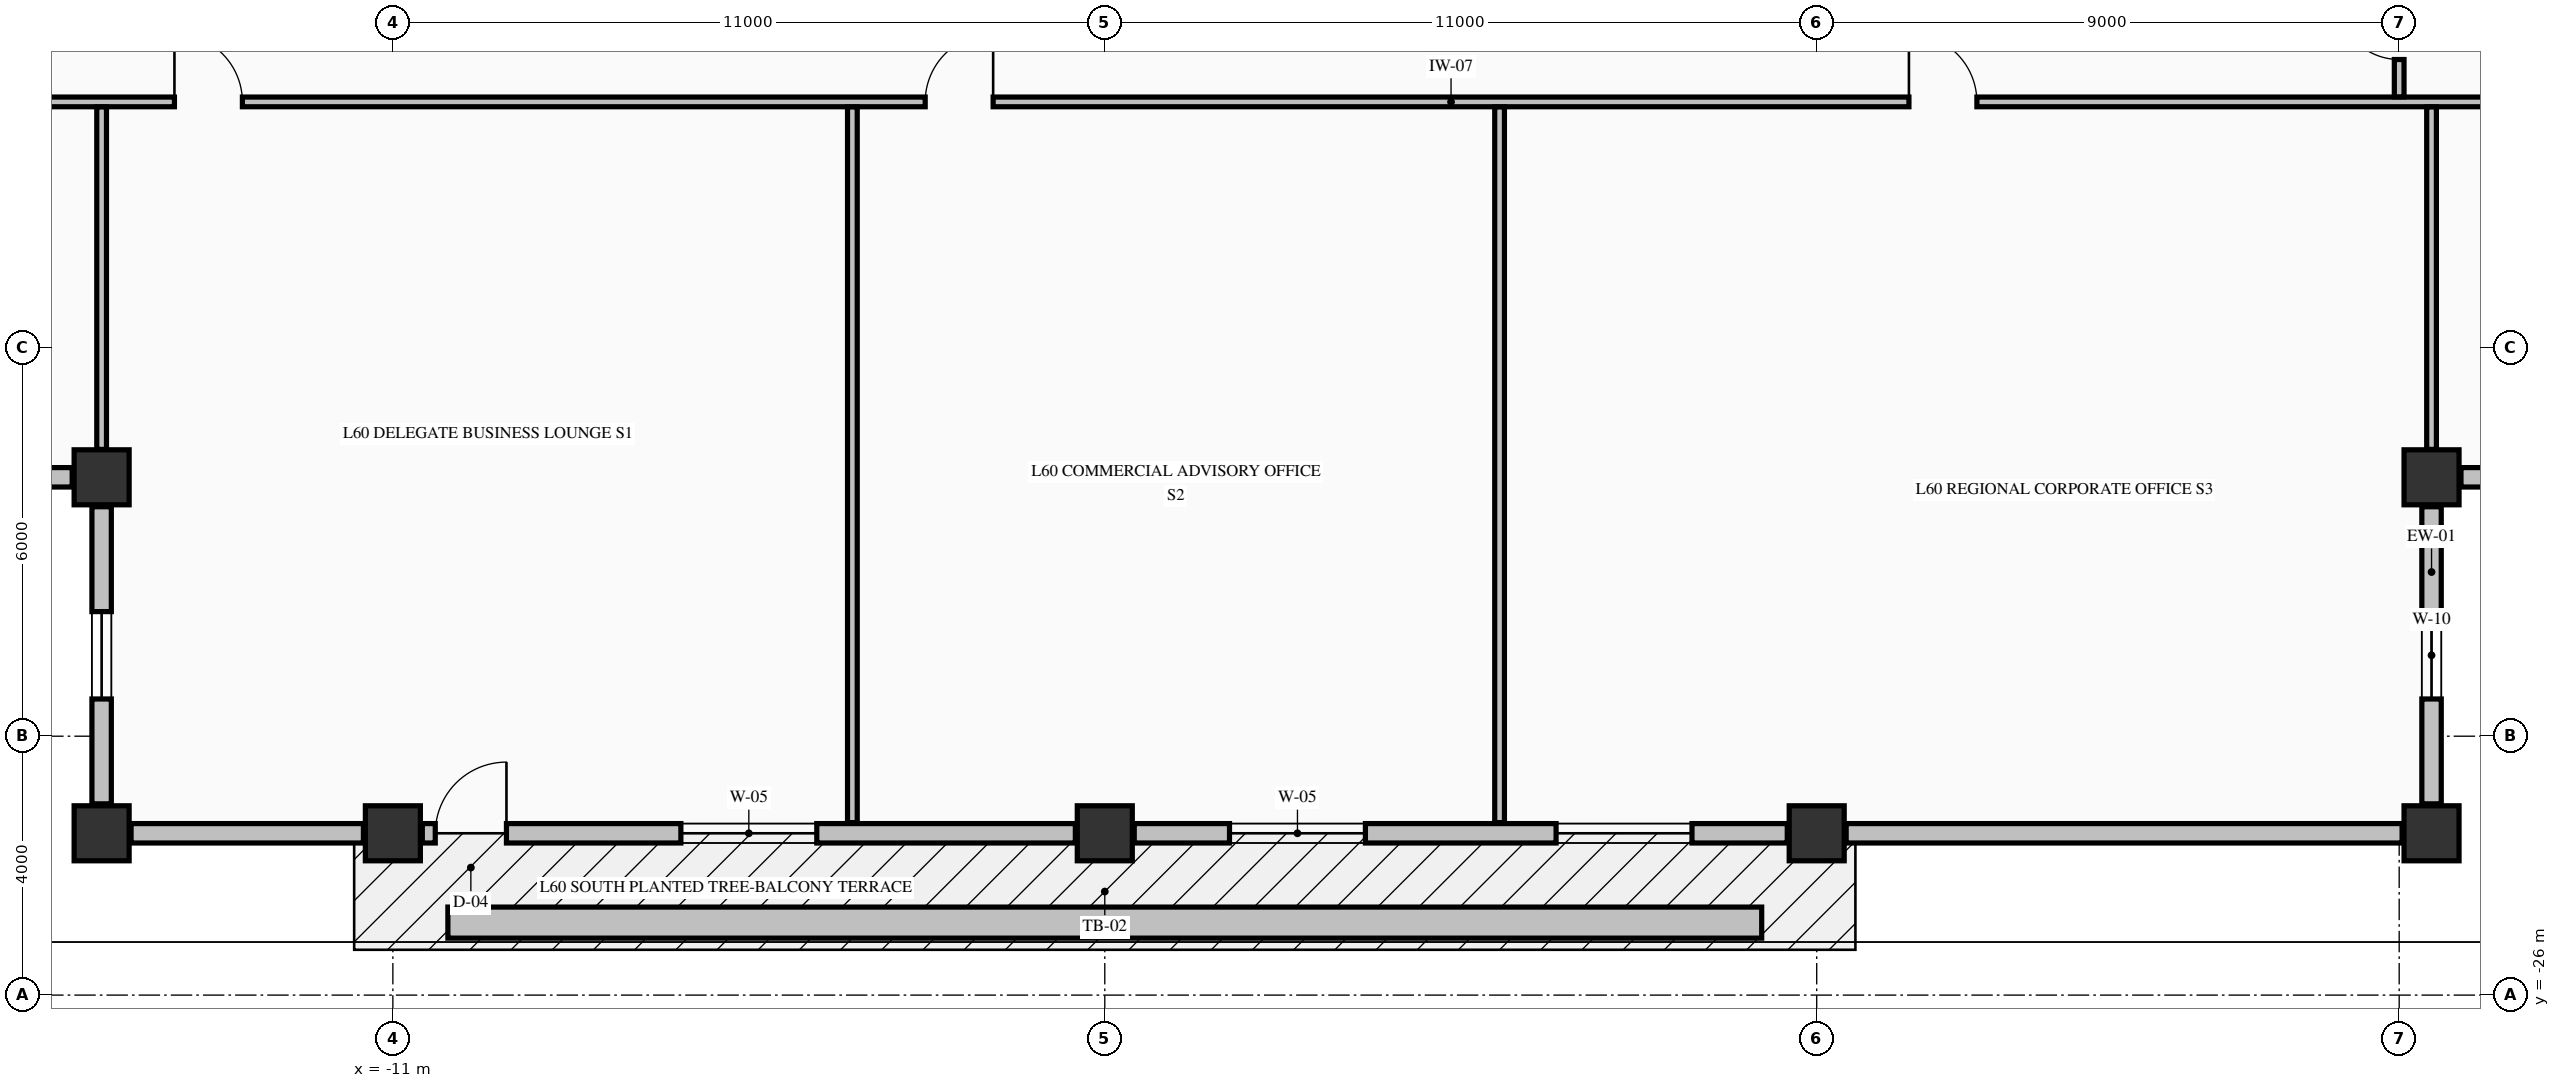
"""IFC4 building model, lengths in metres.
Left out: names, types, materials, properties, quantities, classifications, styles, units other than length and angle.
Written with IfcOpenShell. Run it as: python <this file> out.ifc"""

import sys

from ifc_helpers import new_model, si_unit, direction, frame, frame_2d, origin, origin_2d, place, context, subcontext, project, spatial, rectangle, extrude, element, fill, save


model = new_model("IFC4")
c1 = context("Model", 3, precision=1e-05, world=origin(), true_north=direction((0.0, 1.0)))
c2 = subcontext(c1, "Body", "Model", "MODEL_VIEW")
j1 = project(units=[si_unit("LENGTHUNIT", "METRE"), si_unit("PLANEANGLEUNIT", "RADIAN")], contexts=[c1])
p1 = place(None, origin())
s1 = spatial("IfcSite", under=j1, at=p1, CompositionType="ELEMENT")
p2 = place(p1, origin())
s2 = spatial("IfcBuilding", under=s1, at=p2, CompositionType="ELEMENT")
p3 = place(p2, frame((0.0, 0.0, 230.05)))
s3 = spatial("IfcBuildingStorey", under=s2, at=p3, CompositionType="ELEMENT", Elevation=230.05)
for number, where, z_axis, x_axis in (
    (1, (-15.5, -23.5, -0.25), (0.0, 0.0, 1.0), (1.0, 0.0, 0.0)),
    (2, (-11.0, -23.5, -0.25), (0.0, 0.0, 1.0), (1.0, 0.0, 0.0)),
    (3, (0.0, -23.5, -0.25), (0.0, 0.0, 1.0), (1.0, 0.0, 0.0)),
    (4, (11.0, -23.5, -0.25), (0.0, 0.0, 1.0), (1.0, 0.0, 0.0)),
    (5, (20.5, -23.5, -0.25), (0.0, 0.0, 1.0), (1.0, 0.0, 0.0)),
    (6, (-15.5, -18.0, -0.25), (0.0, 0.0, 1.0), (1.0, 0.0, 0.0)),
    (7, (20.5, -18.0, -0.25), (0.0, 0.0, 1.0), (1.0, 0.0, 0.0)),
):
    element("IfcColumn", number, at=place(p3, frame(where, z_axis=z_axis, x_axis=x_axis)), inside=s3, PredefinedType="COLUMN", context=c2, shape_type="SweptSolid", body=[
        extrude(rectangle(XDim=0.85, YDim=0.85, at=origin_2d()), origin(), (0.0, 0.0, 1.0), 3.23),
    ])
p4 = place(p3, frame((20.5, -23.045, 0.0), z_axis=(0.0, 0.0, 1.0), x_axis=(0.0, 1.0, 0.0)))
e8 = element("IfcWall", 8, at=p4, inside=s3, PredefinedType="STANDARD", context=c2, shape_type="SweptSolid", body=[
    extrude(rectangle(XDim=4.59, YDim=0.3, at=frame_2d((2.295, 0.0))), origin(), (0.0, 0.0, 1.0), 2.372),
])
p5 = place(p4, frame((1.62, 0.0, 0.68)))
e9 = element("IfcOpeningElement", 9, at=p5, cuts=e8, PredefinedType="OPENING", context=c2, shape_type="SweptSolid", body=[
    extrude(rectangle(XDim=1.35, YDim=1.42, at=frame_2d((0.675, 0.71))), frame((0.0, 0.16, 0.0), z_axis=(0.0, -1.0, 0.0), x_axis=(1.0, 0.0, 0.0)), (0.0, 0.0, 1.0), 0.32),
])
p6 = place(p3, frame((20.955, -18.0, 0.0), z_axis=(0.0, 0.0, 1.0), x_axis=(1.0, 0.0, 0.0)))
e10 = element("IfcWall", 10, at=p6, inside=s3, PredefinedType="STANDARD", context=c2, shape_type="SweptSolid", body=[
    extrude(rectangle(XDim=4.59, YDim=0.3, at=frame_2d((2.295, 0.0))), origin(), (0.0, 0.0, 1.0), 2.372),
])
p7 = place(p6, frame((1.62, 0.0, 0.68)))
e11 = element("IfcOpeningElement", 11, at=p7, cuts=e10, PredefinedType="OPENING", context=c2, shape_type="SweptSolid", body=[
    extrude(rectangle(XDim=1.35, YDim=1.42, at=frame_2d((0.675, 0.71))), frame((0.0, 0.16, 0.0), z_axis=(0.0, -1.0, 0.0), x_axis=(1.0, 0.0, 0.0)), (0.0, 0.0, 1.0), 0.32),
])
p8 = place(p3, frame((-20.545, -18.0, 0.0), z_axis=(0.0, 0.0, 1.0), x_axis=(1.0, 0.0, 0.0)))
e12 = element("IfcWall", 12, at=p8, inside=s3, PredefinedType="STANDARD", context=c2, shape_type="SweptSolid", body=[
    extrude(rectangle(XDim=4.59, YDim=0.3, at=frame_2d((2.295, 0.0))), origin(), (0.0, 0.0, 1.0), 2.372),
])
p9 = place(p8, frame((1.62, 0.0, 0.68)))
e13 = element("IfcOpeningElement", 13, at=p9, cuts=e12, PredefinedType="OPENING", context=c2, shape_type="SweptSolid", body=[
    extrude(rectangle(XDim=1.35, YDim=1.42, at=frame_2d((0.675, 0.71))), frame((0.0, 0.16, 0.0), z_axis=(0.0, -1.0, 0.0), x_axis=(1.0, 0.0, 0.0)), (0.0, 0.0, 1.0), 0.32),
])
p10 = place(p3, frame((-15.5, -18.455, 0.0), z_axis=(0.0, 0.0, 1.0), x_axis=(0.0, -1.0, 0.0)))
e14 = element("IfcWall", 14, at=p10, inside=s3, PredefinedType="STANDARD", context=c2, shape_type="SweptSolid", body=[
    extrude(rectangle(XDim=4.59, YDim=0.3, at=frame_2d((2.295, 0.0))), origin(), (0.0, 0.0, 1.0), 2.372),
])
p11 = place(p10, frame((1.62, 0.0, 0.68)))
e15 = element("IfcOpeningElement", 15, at=p11, cuts=e14, PredefinedType="OPENING", context=c2, shape_type="SweptSolid", body=[
    extrude(rectangle(XDim=1.35, YDim=1.42, at=frame_2d((0.675, 0.71))), frame((0.0, 0.16, 0.0), z_axis=(0.0, -1.0, 0.0), x_axis=(1.0, 0.0, 0.0)), (0.0, 0.0, 1.0), 0.32),
])
p12 = place(p3, frame((-15.045, -23.5, 0.0), z_axis=(0.0, 0.0, 1.0), x_axis=(1.0, 0.0, 0.0)))
e16 = element("IfcWall", 16, at=p12, inside=s3, PredefinedType="STANDARD", context=c2, shape_type="SweptSolid", body=[
    extrude(rectangle(XDim=3.59, YDim=0.3, at=frame_2d((1.795, 0.0))), origin(), (0.0, 0.0, 1.0), 2.372),
])
p13 = place(p3, frame((-10.545, -23.5, 0.0), z_axis=(0.0, 0.0, 1.0), x_axis=(1.0, 0.0, 0.0)))
e17 = element("IfcWall", 17, at=p13, inside=s3, PredefinedType="STANDARD", context=c2, shape_type="SweptSolid", body=[
    extrude(rectangle(XDim=10.09, YDim=0.3, at=frame_2d((5.045, 0.0))), origin(), (0.0, 0.0, 1.0), 2.372),
])
p14 = place(p13, frame((0.2, 0.0, 0.0)))
e18 = element("IfcOpeningElement", 18, at=p14, cuts=e17, PredefinedType="OPENING", context=c2, shape_type="SweptSolid", body=[
    extrude(rectangle(XDim=1.1, YDim=2.15, at=frame_2d((0.55, 1.075))), frame((0.0, 0.16, 0.0), z_axis=(0.0, -1.0, 0.0), x_axis=(1.0, 0.0, 0.0)), (0.0, 0.0, 1.0), 0.32),
])
p15 = place(p13, frame((3.995, 0.0, 0.7)))
e19 = element("IfcOpeningElement", 19, at=p15, cuts=e17, PredefinedType="OPENING", context=c2, shape_type="SweptSolid", body=[
    extrude(rectangle(XDim=2.1, YDim=1.5, at=frame_2d((1.05, 0.75))), frame((0.0, 0.16, 0.0), z_axis=(0.0, -1.0, 0.0), x_axis=(1.0, 0.0, 0.0)), (0.0, 0.0, 1.0), 0.32),
])
p16 = place(p3, frame((0.455, -23.5, 0.0), z_axis=(0.0, 0.0, 1.0), x_axis=(1.0, 0.0, 0.0)))
e20 = element("IfcWall", 20, at=p16, inside=s3, PredefinedType="STANDARD", context=c2, shape_type="SweptSolid", body=[
    extrude(rectangle(XDim=10.09, YDim=0.3, at=frame_2d((5.045, 0.0))), origin(), (0.0, 0.0, 1.0), 2.372),
])
p17 = place(p16, frame((1.472, 0.0, 0.7)))
e21 = element("IfcOpeningElement", 21, at=p17, cuts=e20, PredefinedType="OPENING", context=c2, shape_type="SweptSolid", body=[
    extrude(rectangle(XDim=2.1, YDim=1.5, at=frame_2d((1.05, 0.75))), frame((0.0, 0.16, 0.0), z_axis=(0.0, -1.0, 0.0), x_axis=(1.0, 0.0, 0.0)), (0.0, 0.0, 1.0), 0.32),
])
p18 = place(p16, frame((6.518, 0.0, 0.7)))
e22 = element("IfcOpeningElement", 22, at=p18, cuts=e20, PredefinedType="OPENING", context=c2, shape_type="SweptSolid", body=[
    extrude(rectangle(XDim=2.1, YDim=1.5, at=frame_2d((1.05, 0.75))), frame((0.0, 0.16, 0.0), z_axis=(0.0, -1.0, 0.0), x_axis=(1.0, 0.0, 0.0)), (0.0, 0.0, 1.0), 0.32),
])
p19 = place(p3, frame((11.455, -23.5, 0.0), z_axis=(0.0, 0.0, 1.0), x_axis=(1.0, 0.0, 0.0)))
e23 = element("IfcWall", 23, at=p19, inside=s3, PredefinedType="STANDARD", context=c2, shape_type="SweptSolid", body=[
    extrude(rectangle(XDim=8.59, YDim=0.3, at=frame_2d((4.295, 0.0))), origin(), (0.0, 0.0, 1.0), 2.372),
])
p20 = place(p3, frame((-20.075, -12.2, 0.0), z_axis=(0.0, 0.0, 1.0), x_axis=(1.0, 0.0, 0.0)))
e24 = element("IfcWall", 24, at=p20, inside=s3, PredefinedType="PARTITIONING", context=c2, shape_type="SweptSolid", body=[
    extrude(rectangle(XDim=45.91, YDim=0.15, at=frame_2d((22.955, 0.0))), origin(), (0.0, 0.0, 1.0), 2.98),
])
p21 = place(p20, frame((5.7, 0.0, 0.0)))
e25 = element("IfcOpeningElement", 25, at=p21, cuts=e24, PredefinedType="OPENING", context=c2, shape_type="SweptSolid", body=[
    extrude(rectangle(XDim=1.05, YDim=2.15, at=frame_2d((0.525, 1.075))), frame((0.0, 0.085, 0.0), z_axis=(0.0, -1.0, 0.0), x_axis=(1.0, 0.0, 0.0)), (0.0, 0.0, 1.0), 0.17),
])
p22 = place(p20, frame((17.3, 0.0, 0.0)))
e26 = element("IfcOpeningElement", 26, at=p22, cuts=e24, PredefinedType="OPENING", context=c2, shape_type="SweptSolid", body=[
    extrude(rectangle(XDim=1.05, YDim=2.15, at=frame_2d((0.525, 1.075))), frame((0.0, 0.085, 0.0), z_axis=(0.0, -1.0, 0.0), x_axis=(1.0, 0.0, 0.0)), (0.0, 0.0, 1.0), 0.17),
])
p23 = place(p20, frame((32.5, 0.0, 0.0)))
e27 = element("IfcOpeningElement", 27, at=p23, cuts=e24, PredefinedType="OPENING", context=c2, shape_type="SweptSolid", body=[
    extrude(rectangle(XDim=1.05, YDim=2.15, at=frame_2d((0.525, 1.075))), frame((0.0, 0.085, 0.0), z_axis=(0.0, -1.0, 0.0), x_axis=(1.0, 0.0, 0.0)), (0.0, 0.0, 1.0), 0.17),
])
p24 = place(p3, frame((-15.5, -17.569, 0.0), z_axis=(0.0, 0.0, 1.0), x_axis=(0.0, 1.0, 0.0)))
e28 = element("IfcWall", 28, at=p24, inside=s3, PredefinedType="PARTITIONING", context=c2, shape_type="SweptSolid", body=[
    extrude(rectangle(XDim=5.291, YDim=0.15, at=frame_2d((2.646, 0.0))), origin(), (0.0, 0.0, 1.0), 2.98),
])
for number, where, z_axis, x_axis in (
    (29, (-3.9, -23.335, 0.0), (0.0, 0.0, 1.0), (0.0, 1.0, 0.0)),
    (30, (6.1, -23.335, 0.0), (0.0, 0.0, 1.0), (0.0, 1.0, 0.0)),
):
    element("IfcWall", number, at=place(p3, frame(where, z_axis=z_axis, x_axis=x_axis)), inside=s3, PredefinedType="PARTITIONING", context=c2, shape_type="SweptSolid", body=[
        extrude(rectangle(XDim=11.057, YDim=0.15, at=frame_2d((5.528, 0.0))), origin(), (0.0, 0.0, 1.0), 2.98),
    ])
p25 = place(p3, frame((20.0, -12.122, 0.0), z_axis=(0.0, 0.0, 1.0), x_axis=(0.0, 1.0, 0.0)))
e31 = element("IfcWall", 31, at=p25, inside=s3, PredefinedType="PARTITIONING", context=c2, shape_type="SweptSolid", body=[
    extrude(rectangle(XDim=1.816, YDim=0.15, at=frame_2d((0.908, 0.0))), origin(), (0.0, 0.0, 1.0), 2.98),
])
p26 = place(p25, frame((0.577, 0.0, 0.0)))
e32 = element("IfcOpeningElement", 32, at=p26, cuts=e31, PredefinedType="OPENING", context=c2, shape_type="SweptSolid", body=[
    extrude(rectangle(XDim=0.95, YDim=2.15, at=frame_2d((0.475, 1.075))), frame((0.0, 0.085, 0.0), z_axis=(0.0, -1.0, 0.0), x_axis=(1.0, 0.0, 0.0)), (0.0, 0.0, 1.0), 0.17),
])
p27 = place(p3, frame((20.5, -17.569, 0.0), z_axis=(0.0, 0.0, 1.0), x_axis=(0.0, 1.0, 0.0)))
e33 = element("IfcWall", 33, at=p27, inside=s3, PredefinedType="PARTITIONING", context=c2, shape_type="SweptSolid", body=[
    extrude(rectangle(XDim=5.291, YDim=0.15, at=frame_2d((2.646, 0.0))), origin(), (0.0, 0.0, 1.0), 2.98),
])
p28 = place(p3, frame((-10.15, -24.88, -0.04), z_axis=(0.0, 0.0, 1.0), x_axis=(1.0, 0.0, 0.0)))
e34 = element("IfcWall", 34, at=p28, inside=s3, PredefinedType="PARAPET", context=c2, shape_type="SweptSolid", body=[
    extrude(rectangle(XDim=20.3, YDim=0.48, at=frame_2d((10.15, 0.0))), origin(), (0.0, 0.0, 1.0), 0.52),
])
p29 = place(p5, origin())
e35 = element("IfcWindow", 35, at=p29, inside=s3, PartitioningType="SINGLE_PANEL", PredefinedType="WINDOW", context=c2, shape_type="SweptSolid", body=[
    extrude(rectangle(XDim=1.35, YDim=1.42, at=frame_2d((0.675, 0.71))), frame((0.0, 0.03, 0.0), z_axis=(0.0, -1.0, 0.0), x_axis=(1.0, 0.0, 0.0)), (0.0, 0.0, 1.0), 0.06),
])
fill(e9, e35)
p30 = place(p11, origin())
e36 = element("IfcWindow", 36, at=p30, inside=s3, PartitioningType="SINGLE_PANEL", PredefinedType="WINDOW", context=c2, shape_type="SweptSolid", body=[
    extrude(rectangle(XDim=1.35, YDim=1.42, at=frame_2d((0.675, 0.71))), frame((0.0, 0.03, 0.0), z_axis=(0.0, -1.0, 0.0), x_axis=(1.0, 0.0, 0.0)), (0.0, 0.0, 1.0), 0.06),
])
fill(e15, e36)
p31 = place(p14, origin())
e37 = element("IfcDoor", 37, at=p31, inside=s3, OperationType="SINGLE_SWING_RIGHT", PredefinedType="DOOR", context=c2, shape_type="SweptSolid", body=[
    extrude(rectangle(XDim=1.1, YDim=2.15, at=frame_2d((0.55, 1.075))), frame((0.0, 0.025, 0.0), z_axis=(0.0, -1.0, 0.0), x_axis=(1.0, 0.0, 0.0)), (0.0, 0.0, 1.0), 0.05),
])
fill(e18, e37)
p32 = place(p15, origin())
e38 = element("IfcWindow", 38, at=p32, inside=s3, PartitioningType="SINGLE_PANEL", PredefinedType="WINDOW", context=c2, shape_type="SweptSolid", body=[
    extrude(rectangle(XDim=2.1, YDim=1.5, at=frame_2d((1.05, 0.75))), frame((0.0, 0.03, 0.0), z_axis=(0.0, -1.0, 0.0), x_axis=(1.0, 0.0, 0.0)), (0.0, 0.0, 1.0), 0.06),
])
fill(e19, e38)
p33 = place(p17, origin())
e39 = element("IfcWindow", 39, at=p33, inside=s3, PartitioningType="SINGLE_PANEL", PredefinedType="WINDOW", context=c2, shape_type="SweptSolid", body=[
    extrude(rectangle(XDim=2.1, YDim=1.5, at=frame_2d((1.05, 0.75))), frame((0.0, 0.03, 0.0), z_axis=(0.0, -1.0, 0.0), x_axis=(1.0, 0.0, 0.0)), (0.0, 0.0, 1.0), 0.06),
])
fill(e21, e39)
p34 = place(p18, origin())
e40 = element("IfcWindow", 40, at=p34, inside=s3, PartitioningType="SINGLE_PANEL", PredefinedType="WINDOW", context=c2, shape_type="SweptSolid", body=[
    extrude(rectangle(XDim=2.1, YDim=1.5, at=frame_2d((1.05, 0.75))), frame((0.0, 0.03, 0.0), z_axis=(0.0, -1.0, 0.0), x_axis=(1.0, 0.0, 0.0)), (0.0, 0.0, 1.0), 0.06),
])
fill(e22, e40)
p35 = place(p21, origin())
e41 = element("IfcDoor", 41, at=p35, inside=s3, OperationType="SINGLE_SWING_LEFT", PredefinedType="DOOR", context=c2, shape_type="SweptSolid", body=[
    extrude(rectangle(XDim=1.05, YDim=2.15, at=frame_2d((0.525, 1.075))), frame((0.0, 0.025, 0.0), z_axis=(0.0, -1.0, 0.0), x_axis=(1.0, 0.0, 0.0)), (0.0, 0.0, 1.0), 0.05),
])
fill(e25, e41)
p36 = place(p22, origin())
e42 = element("IfcDoor", 42, at=p36, inside=s3, OperationType="SINGLE_SWING_RIGHT", PredefinedType="DOOR", context=c2, shape_type="SweptSolid", body=[
    extrude(rectangle(XDim=1.05, YDim=2.15, at=frame_2d((0.525, 1.075))), frame((0.0, 0.025, 0.0), z_axis=(0.0, -1.0, 0.0), x_axis=(1.0, 0.0, 0.0)), (0.0, 0.0, 1.0), 0.05),
])
fill(e26, e42)
p37 = place(p23, origin())
e43 = element("IfcDoor", 43, at=p37, inside=s3, OperationType="SINGLE_SWING_LEFT", PredefinedType="DOOR", context=c2, shape_type="SweptSolid", body=[
    extrude(rectangle(XDim=1.05, YDim=2.15, at=frame_2d((0.525, 1.075))), frame((0.0, 0.025, 0.0), z_axis=(0.0, -1.0, 0.0), x_axis=(1.0, 0.0, 0.0)), (0.0, 0.0, 1.0), 0.05),
])
fill(e27, e43)
p38 = place(p26, origin())
e44 = element("IfcDoor", 44, at=p38, inside=s3, OperationType="SINGLE_SWING_RIGHT", PredefinedType="DOOR", context=c2, shape_type="SweptSolid", body=[
    extrude(rectangle(XDim=0.95, YDim=2.15, at=frame_2d((0.475, 1.075))), frame((0.0, 0.025, 0.0), z_axis=(0.0, -1.0, 0.0), x_axis=(1.0, 0.0, 0.0)), (0.0, 0.0, 1.0), 0.05),
])
fill(e32, e44)
save(model, sys.argv[1])
